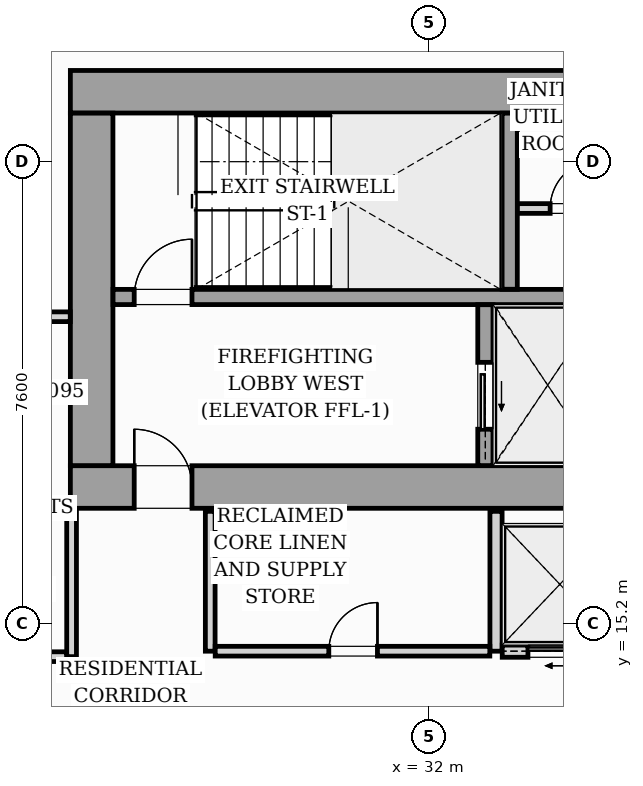
"""IFC4 building model, lengths in metres.
Left out: names, types, materials, properties, quantities, classifications, styles, units other than length and angle.
Written with IfcOpenShell. Run it as: python <this file> out.ifc"""

import sys

from ifc_helpers import new_model, si_unit, direction, frame, frame_2d, origin, origin_2d, place, context, subcontext, project, spatial, rectangle, i_section, extrude, source, transform, mapped, element, fill, save


model = new_model("IFC4")
c1 = context("Model", 3, precision=1e-05, world=origin(), true_north=direction((0.0, 1.0)))
c2 = subcontext(c1, "Body", "Model", "MODEL_VIEW")
j1 = project(units=[si_unit("LENGTHUNIT", "METRE"), si_unit("PLANEANGLEUNIT", "RADIAN")], contexts=[c1])
p1 = place(None, origin())
s1 = spatial("IfcSite", under=j1, at=p1, CompositionType="ELEMENT")
p2 = place(p1, origin())
s2 = spatial("IfcBuilding", under=s1, at=p2, CompositionType="ELEMENT")
p3 = place(p2, frame((0.0, 0.0, 127.8)))
s3 = spatial("IfcBuildingStorey", under=s2, at=p3, CompositionType="ELEMENT", Elevation=127.8)
m1 = source(origin(), c2, "Body", "SweptSolid", [
    extrude(i_section(OverallWidth=0.421, OverallDepth=0.465, WebThickness=0.045, FlangeThickness=0.073, FilletRadius=0.018, at=origin_2d()), origin(), (0.0, 0.0, 1.0), 3.196),
])
for number, where, z_axis, x_axis in (
    (1, (26.4, 17.4, 0.002), (0.0, 0.0, 1.0), (1.0, 0.0, 0.0)),
    (2, (33.12, 17.4, 0.002), (0.0, 0.0, 1.0), (1.0, 0.0, 0.0)),
    (3, (26.4, 24.0, 0.002), (0.0, 0.0, 1.0), (1.0, 0.0, 0.0)),
    (4, (33.12, 24.0, 0.002), (0.0, 0.0, 1.0), (1.0, 0.0, 0.0)),
):
    element("IfcColumn", number, at=place(p3, frame(where, z_axis=z_axis, x_axis=x_axis)), inside=s3, PredefinedType="PILASTER", context=c2, shape_type="MappedRepresentation", body=[
        mapped(m1, transform((0.0, 0.0, 0.0), scale=1.0)),
    ])
p4 = place(p3, frame((26.1, 17.45, 0.0), z_axis=(0.0, 0.0, 1.0), x_axis=(1.0, 0.0, 0.0)))
e5 = element("IfcWall", 5, at=p4, inside=s3, PredefinedType="SHEAR", context=c2, shape_type="SweptSolid", body=[
    extrude(rectangle(XDim=19.8, YDim=0.7, at=frame_2d((9.9, 0.0))), origin(), (0.0, 0.0, 1.0), 3.2),
])
p5 = place(p4, frame((1.05, 0.0, 0.0)))
e6 = element("IfcOpeningElement", 6, at=p5, cuts=e5, PredefinedType="OPENING", context=c2, shape_type="SweptSolid", body=[
    extrude(rectangle(XDim=0.95, YDim=2.06, at=frame_2d((0.475, 1.03))), frame((0.0, 0.36, 0.0), z_axis=(0.0, -1.0, 0.0), x_axis=(1.0, 0.0, 0.0)), (0.0, 0.0, 1.0), 0.72),
])
p6 = place(p4, frame((9.48, 0.0, 0.0)))
e7 = element("IfcOpeningElement", 7, at=p6, cuts=e5, PredefinedType="OPENING", context=c2, shape_type="SweptSolid", body=[
    extrude(rectangle(XDim=0.85, YDim=2.0, at=frame_2d((0.425, 1.0))), frame((0.0, 0.36, 0.0), z_axis=(0.0, -1.0, 0.0), x_axis=(1.0, 0.0, 0.0)), (0.0, 0.0, 1.0), 0.72),
])
p7 = place(p4, frame((17.65, 0.0, 0.0)))
e8 = element("IfcOpeningElement", 8, at=p7, cuts=e5, PredefinedType="OPENING", context=c2, shape_type="SweptSolid", body=[
    extrude(rectangle(XDim=0.95, YDim=2.06, at=frame_2d((0.475, 1.03))), frame((0.0, 0.36, 0.0), z_axis=(0.0, -1.0, 0.0), x_axis=(1.0, 0.0, 0.0)), (0.0, 0.0, 1.0), 0.72),
])
p8 = place(p3, frame((26.1, 23.95, 0.0), z_axis=(0.0, 0.0, 1.0), x_axis=(1.0, 0.0, 0.0)))
e9 = element("IfcWall", 9, at=p8, inside=s3, PredefinedType="SHEAR", context=c2, shape_type="SweptSolid", body=[
    extrude(rectangle(XDim=19.8, YDim=0.7, at=frame_2d((9.9, 0.0))), origin(), (0.0, 0.0, 1.0), 3.2),
])
p9 = place(p3, frame((26.45, 17.802, 0.0), z_axis=(0.0, 0.0, 1.0), x_axis=(0.0, 1.0, 0.0)))
e10 = element("IfcWall", 10, at=p9, inside=s3, PredefinedType="SHEAR", context=c2, shape_type="SweptSolid", body=[
    extrude(rectangle(XDim=5.796, YDim=0.7, at=frame_2d((2.898, 0.0))), origin(), (0.0, 0.0, 1.0), 3.2),
])
p10 = place(p3, frame((26.802, 20.575, 0.0), z_axis=(0.0, 0.0, 1.0), x_axis=(1.0, 0.0, 0.0)))
e11 = element("IfcWall", 11, at=p10, inside=s3, PredefinedType="SOLIDWALL", context=c2, shape_type="SweptSolid", body=[
    extrude(rectangle(XDim=8.148, YDim=0.25, at=frame_2d((4.074, 0.0))), origin(), (0.0, 0.0, 1.0), 3.2),
])
p11 = place(p10, frame((0.348, 0.0, 0.0)))
e12 = element("IfcOpeningElement", 12, at=p11, cuts=e11, PredefinedType="OPENING", context=c2, shape_type="SweptSolid", body=[
    extrude(rectangle(XDim=0.95, YDim=2.06, at=frame_2d((0.475, 1.03))), frame((0.0, 0.135, 0.0), z_axis=(0.0, -1.0, 0.0), x_axis=(1.0, 0.0, 0.0)), (0.0, 0.0, 1.0), 0.27),
])
p12 = place(p3, frame((33.325, 20.702, 0.0), z_axis=(0.0, 0.0, 1.0), x_axis=(0.0, 1.0, 0.0)))
e13 = element("IfcWall", 13, at=p12, inside=s3, PredefinedType="SOLIDWALL", context=c2, shape_type="SweptSolid", body=[
    extrude(rectangle(XDim=2.896, YDim=0.25, at=frame_2d((1.448, 0.0))), origin(), (0.0, 0.0, 1.0), 3.2),
])
p13 = place(p3, frame((32.925, 17.802, 0.0), z_axis=(0.0, 0.0, 1.0), x_axis=(0.0, 1.0, 0.0)))
e14 = element("IfcWall", 14, at=p13, inside=s3, PredefinedType="SOLIDWALL", context=c2, shape_type="SweptSolid", body=[
    extrude(rectangle(XDim=2.646, YDim=0.25, at=frame_2d((1.323, 0.0))), origin(), (0.0, 0.0, 1.0), 3.2),
])
p14 = place(p13, frame((0.598, 0.0, 0.0)))
e15 = element("IfcOpeningElement", 15, at=p14, cuts=e14, PredefinedType="OPENING", context=c2, shape_type="SweptSolid", body=[
    extrude(rectangle(XDim=1.1, YDim=2.08, at=frame_2d((0.55, 1.04))), frame((0.0, 0.135, 0.0), z_axis=(0.0, -1.0, 0.0), x_axis=(1.0, 0.0, 0.0)), (0.0, 0.0, 1.0), 0.27),
])
p15 = place(p3, frame((33.452, 22.03, 0.0), z_axis=(0.0, 0.0, 1.0), x_axis=(1.0, 0.0, 0.0)))
e16 = element("IfcWall", 16, at=p15, inside=s3, PredefinedType="PARTITIONING", context=c2, shape_type="SweptSolid", body=[
    extrude(rectangle(XDim=5.096, YDim=0.16, at=frame_2d((2.548, 0.0))), origin(), (0.0, 0.0, 1.0), 2.94),
])
p16 = place(p15, frame((0.538, 0.0, 0.0)))
e17 = element("IfcOpeningElement", 17, at=p16, cuts=e16, PredefinedType="OPENING", context=c2, shape_type="SweptSolid", body=[
    extrude(rectangle(XDim=0.8, YDim=2.05, at=frame_2d((0.4, 1.025))), frame((0.0, 0.09, 0.0), z_axis=(0.0, -1.0, 0.0), x_axis=(1.0, 0.0, 0.0)), (0.0, 0.0, 1.0), 0.18),
])
p17 = place(p15, frame((3.158, 0.0, 0.0)))
e18 = element("IfcOpeningElement", 18, at=p17, cuts=e16, PredefinedType="OPENING", context=c2, shape_type="SweptSolid", body=[
    extrude(rectangle(XDim=0.8, YDim=2.05, at=frame_2d((0.4, 1.025))), frame((0.0, 0.09, 0.0), z_axis=(0.0, -1.0, 0.0), x_axis=(1.0, 0.0, 0.0)), (0.0, 0.0, 1.0), 0.18),
])
p18 = place(p3, frame((28.4, 14.75, 0.0), z_axis=(0.0, 0.0, 1.0), x_axis=(0.0, 1.0, 0.0)))
e19 = element("IfcWall", 19, at=p18, inside=s3, PredefinedType="PARTITIONING", context=c2, shape_type="SweptSolid", body=[
    extrude(rectangle(XDim=2.3, YDim=0.16, at=frame_2d((1.15, 0.0))), origin(), (0.0, 0.0, 1.0), 2.94),
])
p19 = place(p3, frame((33.1, 14.75, 0.0), z_axis=(0.0, 0.0, 1.0), x_axis=(0.0, 1.0, 0.0)))
e20 = element("IfcWall", 20, at=p19, inside=s3, PredefinedType="PARTITIONING", context=c2, shape_type="SweptSolid", body=[
    extrude(rectangle(XDim=2.3, YDim=0.2, at=frame_2d((1.15, 0.0))), origin(), (0.0, 0.0, 1.0), 2.94),
])
p20 = place(p3, frame((28.482, 14.75, 0.0), z_axis=(0.0, 0.0, 1.0), x_axis=(1.0, 0.0, 0.0)))
e21 = element("IfcWall", 21, at=p20, inside=s3, PredefinedType="PARTITIONING", context=c2, shape_type="SweptSolid", body=[
    extrude(rectangle(XDim=4.516, YDim=0.16, at=frame_2d((2.258, 0.0))), origin(), (0.0, 0.0, 1.0), 2.94),
])
p21 = place(p20, frame((1.868, 0.0, 0.0)))
e22 = element("IfcOpeningElement", 22, at=p21, cuts=e21, PredefinedType="OPENING", context=c2, shape_type="SweptSolid", body=[
    extrude(rectangle(XDim=0.8, YDim=2.05, at=frame_2d((0.4, 1.025))), frame((0.0, 0.09, 0.0), z_axis=(0.0, -1.0, 0.0), x_axis=(1.0, 0.0, 0.0)), (0.0, 0.0, 1.0), 0.18),
])
p22 = place(p3, frame((33.202, 14.75, 0.0), z_axis=(0.0, 0.0, 1.0), x_axis=(1.0, 0.0, 0.0)))
e23 = element("IfcWall", 23, at=p22, inside=s3, PredefinedType="PARTITIONING", context=c2, shape_type="SweptSolid", body=[
    extrude(rectangle(XDim=1.896, YDim=0.2, at=frame_2d((0.948, 0.0))), origin(), (0.0, 0.0, 1.0), 2.94),
])
p23 = place(p22, frame((0.423, 0.0, 0.0)))
e24 = element("IfcOpeningElement", 24, at=p23, cuts=e23, PredefinedType="OPENING", context=c2, shape_type="SweptSolid", body=[
    extrude(rectangle(XDim=1.05, YDim=2.08, at=frame_2d((0.525, 1.04))), frame((0.0, 0.11, 0.0), z_axis=(0.0, -1.0, 0.0), x_axis=(1.0, 0.0, 0.0)), (0.0, 0.0, 1.0), 0.22),
])
p24 = place(p3, frame((24.182, 20.25, 0.0), z_axis=(0.0, 0.0, 1.0), x_axis=(1.0, 0.0, 0.0)))
e25 = element("IfcWall", 25, at=p24, inside=s3, PredefinedType="PARTITIONING", context=c2, shape_type="SweptSolid", body=[
    extrude(rectangle(XDim=1.916, YDim=0.16, at=frame_2d((0.958, 0.0))), origin(), (0.0, 0.0, 1.0), 2.94),
])
p25 = place(p3, frame((26.12, 14.66, 0.0), z_axis=(0.0, 0.0, 1.0), x_axis=(0.0, 1.0, 0.0)))
e26 = element("IfcWall", 26, at=p25, inside=s3, PredefinedType="PARTITIONING", context=c2, shape_type="SweptSolid", body=[
    extrude(rectangle(XDim=2.438, YDim=0.16, at=frame_2d((1.219, 0.0))), origin(), (0.0, 0.0, 1.0), 2.94),
])
p26 = place(p3, frame((24.182, 14.66, 0.0), z_axis=(0.0, 0.0, 1.0), x_axis=(1.0, 0.0, 0.0)))
e27 = element("IfcWall", 27, at=p26, inside=s3, PredefinedType="PARTITIONING", context=c2, shape_type="SweptSolid", body=[
    extrude(rectangle(XDim=1.856, YDim=0.16, at=frame_2d((0.928, 0.0))), origin(), (0.0, 0.0, 1.0), 2.94),
])
m2 = source(origin(), c2, "Body", "SweptSolid", [
    extrude(rectangle(XDim=0.95, YDim=2.06, at=frame_2d((0.475, 1.03))), frame((0.0, 0.025, 0.0), z_axis=(0.0, -1.0, 0.0), x_axis=(1.0, 0.0, 0.0)), (0.0, 0.0, 1.0), 0.05),
])
p27 = place(p5, origin())
e28 = element("IfcDoor", 28, at=p27, inside=s3, OperationType="SINGLE_SWING_LEFT", PredefinedType="DOOR", context=c2, shape_type="MappedRepresentation", body=[
    mapped(m2, transform((0.0, 0.0, 0.0), scale=1.0)),
])
fill(e6, e28)
p28 = place(p11, origin())
e29 = element("IfcDoor", 29, at=p28, inside=s3, OperationType="SINGLE_SWING_RIGHT", PredefinedType="DOOR", context=c2, shape_type="MappedRepresentation", body=[
    mapped(m2, transform((0.0, 0.0, 0.0), scale=1.0)),
])
fill(e12, e29)
m3 = source(origin(), c2, "Body", "SweptSolid", [
    extrude(rectangle(XDim=1.1, YDim=2.08, at=frame_2d((0.55, 1.04))), frame((0.0, 0.025, 0.0), z_axis=(0.0, -1.0, 0.0), x_axis=(1.0, 0.0, 0.0)), (0.0, 0.0, 1.0), 0.05),
])
p29 = place(p14, origin())
e30 = element("IfcDoor", 30, at=p29, inside=s3, OperationType="SLIDING_TO_LEFT", PredefinedType="DOOR", context=c2, shape_type="MappedRepresentation", body=[
    mapped(m3, transform((0.0, 0.0, 0.0), scale=1.0)),
])
fill(e15, e30)
m4 = source(origin(), c2, "Body", "SweptSolid", [
    extrude(rectangle(XDim=0.8, YDim=2.05, at=frame_2d((0.4, 1.025))), frame((0.0, 0.025, 0.0), z_axis=(0.0, -1.0, 0.0), x_axis=(1.0, 0.0, 0.0)), (0.0, 0.0, 1.0), 0.05),
])
p30 = place(p16, origin())
e31 = element("IfcDoor", 31, at=p30, inside=s3, OperationType="SINGLE_SWING_RIGHT", PredefinedType="DOOR", context=c2, shape_type="MappedRepresentation", body=[
    mapped(m4, transform((0.0, 0.0, 0.0), scale=1.0)),
])
fill(e17, e31)
p31 = place(p21, origin())
e32 = element("IfcDoor", 32, at=p31, inside=s3, OperationType="SINGLE_SWING_RIGHT", PredefinedType="DOOR", context=c2, shape_type="MappedRepresentation", body=[
    mapped(m4, transform((0.0, 0.0, 0.0), scale=1.0)),
])
fill(e22, e32)
m5 = source(origin(), c2, "Body", "SweptSolid", [
    extrude(rectangle(XDim=1.05, YDim=2.08, at=frame_2d((0.525, 1.04))), frame((0.0, 0.025, 0.0), z_axis=(0.0, -1.0, 0.0), x_axis=(1.0, 0.0, 0.0)), (0.0, 0.0, 1.0), 0.05),
])
p32 = place(p23, origin())
e33 = element("IfcDoor", 33, at=p32, inside=s3, OperationType="SLIDING_TO_LEFT", PredefinedType="DOOR", context=c2, shape_type="MappedRepresentation", body=[
    mapped(m5, transform((0.0, 0.0, 0.0), scale=1.0)),
])
fill(e24, e33)
save(model, sys.argv[1])
